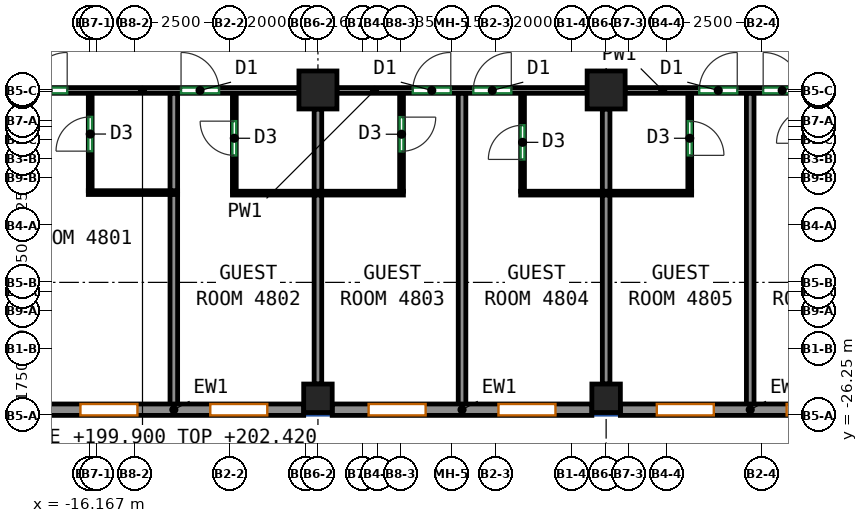
"""IFC4 building model, lengths in metres.
Left out: names, types, materials, properties, quantities, classifications, styles, units other than length and angle.
Written with IfcOpenShell. Run it as: python <this file> out.ifc"""

import sys

from ifc_helpers import new_model, si_unit, direction, frame, frame_2d, origin, origin_2d, place, context, subcontext, project, spatial, rectangle, extrude, source, transform, mapped, element, fill, save


model = new_model("IFC4")
c1 = context("Model", 3, precision=1e-05, world=origin(), true_north=direction((0.0, 1.0)))
c2 = subcontext(c1, "Body", "Model", "MODEL_VIEW")
j1 = project(units=[si_unit("LENGTHUNIT", "METRE"), si_unit("PLANEANGLEUNIT", "RADIAN")], contexts=[c1])
p1 = place(None, origin())
s1 = spatial("IfcSite", under=j1, at=p1, CompositionType="ELEMENT")
p2 = place(p1, origin())
s2 = spatial("IfcBuilding", under=s1, at=p2, CompositionType="ELEMENT")
p3 = place(p2, frame((0.0, 0.0, 199.9)))
s3 = spatial("IfcBuildingStorey", under=s2, at=p3, CompositionType="ELEMENT", Elevation=199.9)
m1 = source(origin(), c2, "Body", "SweptSolid", [
    extrude(rectangle(XDim=0.75, YDim=0.75, at=origin_2d()), origin(), (0.0, 0.0, 1.0), 3.12),
])
p4 = place(p3, frame((-10.167, -25.8, 0.0), z_axis=(0.0, 0.0, 1.0), x_axis=(1.0, 0.0, 0.0)))
e1 = element("IfcColumn", 1, at=p4, inside=s3, PredefinedType="COLUMN", context=c2, shape_type="MappedRepresentation", body=[
    mapped(m1, transform((0.0, 0.0, 0.0))),
])
m2 = source(origin(), c2, "Body", "SweptSolid", [
    extrude(rectangle(XDim=1.0, YDim=1.0, at=origin_2d()), origin(), (0.0, 0.0, 1.0), 3.12),
])
p5 = place(p3, frame((-10.167, -17.688, 0.0), z_axis=(0.0, 0.0, 1.0), x_axis=(1.0, 0.0, 0.0)))
e2 = element("IfcColumn", 2, at=p5, inside=s3, PredefinedType="COLUMN", context=c2, shape_type="MappedRepresentation", body=[
    mapped(m2, transform((0.0, 0.0, 0.0))),
])
p6 = place(p3, frame((-2.583, -25.8, 0.0), z_axis=(0.0, 0.0, 1.0), x_axis=(1.0, 0.0, 0.0)))
e3 = element("IfcColumn", 3, at=p6, inside=s3, PredefinedType="COLUMN", context=c2, shape_type="MappedRepresentation", body=[
    mapped(m1, transform((0.0, 0.0, 0.0))),
])
p7 = place(p3, frame((-2.583, -17.688, 0.0), z_axis=(0.0, 0.0, 1.0), x_axis=(1.0, 0.0, 0.0)))
e4 = element("IfcColumn", 4, at=p7, inside=s3, PredefinedType="COLUMN", context=c2, shape_type="MappedRepresentation", body=[
    mapped(m2, transform((0.0, 0.0, 0.0))),
])
m3 = source(origin(), c2, "Body", "SweptSolid", [
    extrude(rectangle(XDim=6.833, YDim=0.3, at=frame_2d((3.417, 0.0))), origin(), (0.0, 0.0, 1.0), 3.12),
])
p8 = place(p3, frame((-17.375, -26.1, 0.0), z_axis=(0.0, 0.0, 1.0), x_axis=(1.0, 0.0, 0.0)))
e5 = element("IfcWall", 5, at=p8, inside=s3, PredefinedType="SOLIDWALL", context=c2, shape_type="MappedRepresentation", body=[
    mapped(m3, transform((0.0, 0.0, 0.0))),
])
p9 = place(p8, frame((0.958, 0.0, 0.85)))
e6 = element("IfcOpeningElement", 6, at=p9, cuts=e5, PredefinedType="OPENING", context=c2, shape_type="SweptSolid", body=[
    extrude(rectangle(XDim=1.5, YDim=1.95, at=frame_2d((0.75, 0.975))), frame((0.0, 0.16, 0.0), z_axis=(0.0, -1.0, 0.0), x_axis=(1.0, 0.0, 0.0)), (0.0, 0.0, 1.0), 0.32),
])
p10 = place(p8, frame((4.375, 0.0, 0.85)))
e7 = element("IfcOpeningElement", 7, at=p10, cuts=e5, PredefinedType="OPENING", context=c2, shape_type="SweptSolid", body=[
    extrude(rectangle(XDim=1.5, YDim=1.95, at=frame_2d((0.75, 0.975))), frame((0.0, 0.16, 0.0), z_axis=(0.0, -1.0, 0.0), x_axis=(1.0, 0.0, 0.0)), (0.0, 0.0, 1.0), 0.32),
])
m4 = source(origin(), c2, "Body", "SweptSolid", [
    extrude(rectangle(XDim=6.833, YDim=0.3, at=frame_2d((3.417, 0.0))), origin(), (0.0, 0.0, 1.0), 3.12),
])
p11 = place(p3, frame((-9.792, -26.1, 0.0), z_axis=(0.0, 0.0, 1.0), x_axis=(1.0, 0.0, 0.0)))
e8 = element("IfcWall", 8, at=p11, inside=s3, PredefinedType="SOLIDWALL", context=c2, shape_type="MappedRepresentation", body=[
    mapped(m4, transform((0.0, 0.0, 0.0))),
])
p12 = place(p11, frame((0.958, 0.0, 0.85)))
e9 = element("IfcOpeningElement", 9, at=p12, cuts=e8, PredefinedType="OPENING", context=c2, shape_type="SweptSolid", body=[
    extrude(rectangle(XDim=1.5, YDim=1.95, at=frame_2d((0.75, 0.975))), frame((0.0, 0.16, 0.0), z_axis=(0.0, -1.0, 0.0), x_axis=(1.0, 0.0, 0.0)), (0.0, 0.0, 1.0), 0.32),
])
p13 = place(p11, frame((4.375, 0.0, 0.85)))
e10 = element("IfcOpeningElement", 10, at=p13, cuts=e8, PredefinedType="OPENING", context=c2, shape_type="SweptSolid", body=[
    extrude(rectangle(XDim=1.5, YDim=1.95, at=frame_2d((0.75, 0.975))), frame((0.0, 0.16, 0.0), z_axis=(0.0, -1.0, 0.0), x_axis=(1.0, 0.0, 0.0)), (0.0, 0.0, 1.0), 0.32),
])
p14 = place(p3, frame((-2.208, -26.1, 0.0), z_axis=(0.0, 0.0, 1.0), x_axis=(1.0, 0.0, 0.0)))
e11 = element("IfcWall", 11, at=p14, inside=s3, PredefinedType="SOLIDWALL", context=c2, shape_type="MappedRepresentation", body=[
    mapped(m3, transform((0.0, 0.0, 0.0))),
])
p15 = place(p14, frame((0.958, 0.0, 0.85)))
e12 = element("IfcOpeningElement", 12, at=p15, cuts=e11, PredefinedType="OPENING", context=c2, shape_type="SweptSolid", body=[
    extrude(rectangle(XDim=1.5, YDim=1.95, at=frame_2d((0.75, 0.975))), frame((0.0, 0.16, 0.0), z_axis=(0.0, -1.0, 0.0), x_axis=(1.0, 0.0, 0.0)), (0.0, 0.0, 1.0), 0.32),
])
p16 = place(p14, frame((4.375, 0.0, 0.85)))
e13 = element("IfcOpeningElement", 13, at=p16, cuts=e11, PredefinedType="OPENING", context=c2, shape_type="SweptSolid", body=[
    extrude(rectangle(XDim=1.5, YDim=1.95, at=frame_2d((0.75, 0.975))), frame((0.0, 0.16, 0.0), z_axis=(0.0, -1.0, 0.0), x_axis=(1.0, 0.0, 0.0)), (0.0, 0.0, 1.0), 0.32),
])
p17 = place(p3, frame((-18.9, -17.7, 0.0), z_axis=(0.0, 0.0, 1.0), x_axis=(1.0, 0.0, 0.0)))
e14 = element("IfcWall", 14, at=p17, inside=s3, PredefinedType="PARTITIONING", context=c2, shape_type="SweptSolid", body=[
    extrude(rectangle(XDim=8.233, YDim=0.15, at=frame_2d((4.116, 0.0))), origin(), (0.0, 0.0, 1.0), 2.52),
])
p18 = place(p17, frame((1.135, 0.0, 0.0)))
e15 = element("IfcOpeningElement", 15, at=p18, cuts=e14, PredefinedType="OPENING", context=c2, shape_type="SweptSolid", body=[
    extrude(rectangle(XDim=1.0, YDim=2.1, at=frame_2d((0.5, 1.05))), frame((0.0, 0.085, 0.0), z_axis=(0.0, -1.0, 0.0), x_axis=(1.0, 0.0, 0.0)), (0.0, 0.0, 1.0), 0.17),
])
p19 = place(p17, frame((5.131, 0.0, 0.0)))
e16 = element("IfcOpeningElement", 16, at=p19, cuts=e14, PredefinedType="OPENING", context=c2, shape_type="SweptSolid", body=[
    extrude(rectangle(XDim=1.0, YDim=2.1, at=frame_2d((0.5, 1.05))), frame((0.0, 0.085, 0.0), z_axis=(0.0, -1.0, 0.0), x_axis=(1.0, 0.0, 0.0)), (0.0, 0.0, 1.0), 0.17),
])
p20 = place(p3, frame((-9.667, -17.7, 0.0), z_axis=(0.0, 0.0, 1.0), x_axis=(1.0, 0.0, 0.0)))
e17 = element("IfcWall", 17, at=p20, inside=s3, PredefinedType="PARTITIONING", context=c2, shape_type="SweptSolid", body=[
    extrude(rectangle(XDim=6.584, YDim=0.15, at=frame_2d((3.292, 0.0))), origin(), (0.0, 0.0, 1.0), 3.12),
])
p21 = place(p20, frame((1.996, 0.0, 0.0)))
e18 = element("IfcOpeningElement", 18, at=p21, cuts=e17, PredefinedType="OPENING", context=c2, shape_type="SweptSolid", body=[
    extrude(rectangle(XDim=1.0, YDim=2.1, at=frame_2d((0.5, 1.05))), frame((0.0, 0.085, 0.0), z_axis=(0.0, -1.0, 0.0), x_axis=(1.0, 0.0, 0.0)), (0.0, 0.0, 1.0), 0.17),
])
p22 = place(p20, frame((3.588, 0.0, 0.0)))
e19 = element("IfcOpeningElement", 19, at=p22, cuts=e17, PredefinedType="OPENING", context=c2, shape_type="SweptSolid", body=[
    extrude(rectangle(XDim=1.0, YDim=2.1, at=frame_2d((0.5, 1.05))), frame((0.0, 0.085, 0.0), z_axis=(0.0, -1.0, 0.0), x_axis=(1.0, 0.0, 0.0)), (0.0, 0.0, 1.0), 0.17),
])
p23 = place(p3, frame((-2.083, -17.7, 0.0), z_axis=(0.0, 0.0, 1.0), x_axis=(1.0, 0.0, 0.0)))
e20 = element("IfcWall", 20, at=p23, inside=s3, PredefinedType="PARTITIONING", context=c2, shape_type="SweptSolid", body=[
    extrude(rectangle(XDim=6.583, YDim=0.15, at=frame_2d((3.292, 0.0))), origin(), (0.0, 0.0, 1.0), 3.12),
])
p24 = place(p23, frame((1.95, 0.0, 0.0)))
e21 = element("IfcOpeningElement", 21, at=p24, cuts=e20, PredefinedType="OPENING", context=c2, shape_type="SweptSolid", body=[
    extrude(rectangle(XDim=1.0, YDim=2.1, at=frame_2d((0.5, 1.05))), frame((0.0, 0.085, 0.0), z_axis=(0.0, -1.0, 0.0), x_axis=(1.0, 0.0, 0.0)), (0.0, 0.0, 1.0), 0.17),
])
p25 = place(p23, frame((3.632, 0.0, 0.0)))
e22 = element("IfcOpeningElement", 22, at=p25, cuts=e20, PredefinedType="OPENING", context=c2, shape_type="SweptSolid", body=[
    extrude(rectangle(XDim=1.0, YDim=2.1, at=frame_2d((0.5, 1.05))), frame((0.0, 0.085, 0.0), z_axis=(0.0, -1.0, 0.0), x_axis=(1.0, 0.0, 0.0)), (0.0, 0.0, 1.0), 0.17),
])
p26 = place(p3, frame((-16.159, -20.338, 0.0), z_axis=(0.0, 0.0, 1.0), x_axis=(0.0, 1.0, 0.0)))
e23 = element("IfcWall", 23, at=p26, inside=s3, PredefinedType="PARTITIONING", context=c2, shape_type="SweptSolid", body=[
    extrude(rectangle(XDim=2.561, YDim=0.1, at=frame_2d((1.28, 0.0))), origin(), (0.0, 0.0, 1.0), 3.12),
])
p27 = place(p26, frame((1.041, 0.0, 0.0)))
e24 = element("IfcOpeningElement", 24, at=p27, cuts=e23, PredefinedType="OPENING", context=c2, shape_type="SweptSolid", body=[
    extrude(rectangle(XDim=0.9, YDim=2.1, at=frame_2d((0.45, 1.05))), frame((0.0, 0.06, 0.0), z_axis=(0.0, -1.0, 0.0), x_axis=(1.0, 0.0, 0.0)), (0.0, 0.0, 1.0), 0.12),
])
p28 = place(p3, frame((-16.209, -20.388, 0.0), z_axis=(0.0, 0.0, 1.0), x_axis=(1.0, 0.0, 0.0)))
e25 = element("IfcWall", 25, at=p28, inside=s3, PredefinedType="PARTITIONING", context=c2, shape_type="SweptSolid", body=[
    extrude(rectangle(XDim=2.35, YDim=0.1, at=frame_2d((1.175, 0.0))), origin(), (0.0, 0.0, 1.0), 3.12),
])
p29 = place(p3, frame((-13.959, -26.0, 0.0), z_axis=(0.0, 0.0, 1.0), x_axis=(0.0, 1.0, 0.0)))
e26 = element("IfcWall", 26, at=p29, inside=s3, PredefinedType="PARTITIONING", context=c2, shape_type="SweptSolid", body=[
    extrude(rectangle(XDim=5.562, YDim=0.2, at=frame_2d((2.781, 0.0))), origin(), (0.0, 0.0, 1.0), 3.12),
])
p30 = place(p3, frame((-13.959, -20.338, 0.0), z_axis=(0.0, 0.0, 1.0), x_axis=(0.0, 1.0, 0.0)))
e27 = element("IfcWall", 27, at=p30, inside=s3, PredefinedType="PARTITIONING", context=c2, shape_type="SweptSolid", body=[
    extrude(rectangle(XDim=2.561, YDim=0.2, at=frame_2d((1.28, 0.0))), origin(), (0.0, 0.0, 1.0), 3.12),
])
p31 = place(p3, frame((-12.367, -20.352, 0.0), z_axis=(0.0, 0.0, 1.0), x_axis=(0.0, 1.0, 0.0)))
e28 = element("IfcWall", 28, at=p31, inside=s3, PredefinedType="PARTITIONING", context=c2, shape_type="SweptSolid", body=[
    extrude(rectangle(XDim=2.575, YDim=0.1, at=frame_2d((1.288, 0.0))), origin(), (0.0, 0.0, 1.0), 3.12),
])
p32 = place(p31, frame((0.944, 0.0, 0.0)))
e29 = element("IfcOpeningElement", 29, at=p32, cuts=e28, PredefinedType="OPENING", context=c2, shape_type="SweptSolid", body=[
    extrude(rectangle(XDim=0.9, YDim=2.1, at=frame_2d((0.45, 1.05))), frame((0.0, 0.06, 0.0), z_axis=(0.0, -1.0, 0.0), x_axis=(1.0, 0.0, 0.0)), (0.0, 0.0, 1.0), 0.12),
])
p33 = place(p3, frame((-12.417, -20.402, 0.0), z_axis=(0.0, 0.0, 1.0), x_axis=(1.0, 0.0, 0.0)))
e30 = element("IfcWall", 30, at=p33, inside=s3, PredefinedType="PARTITIONING", context=c2, shape_type="SweptSolid", body=[
    extrude(rectangle(XDim=4.5, YDim=0.1, at=frame_2d((2.25, 0.0))), origin(), (0.0, 0.0, 1.0), 3.12),
])
p34 = place(p3, frame((-10.167, -25.425, 0.0), z_axis=(0.0, 0.0, 1.0), x_axis=(0.0, 1.0, 0.0)))
e31 = element("IfcWall", 31, at=p34, inside=s3, PredefinedType="PARTITIONING", context=c2, shape_type="SweptSolid", body=[
    extrude(rectangle(XDim=4.973, YDim=0.2, at=frame_2d((2.487, 0.0))), origin(), (0.0, 0.0, 1.0), 3.12),
])
p35 = place(p3, frame((-10.167, -20.352, 0.0), z_axis=(0.0, 0.0, 1.0), x_axis=(0.0, 1.0, 0.0)))
e32 = element("IfcWall", 32, at=p35, inside=s3, PredefinedType="PARTITIONING", context=c2, shape_type="SweptSolid", body=[
    extrude(rectangle(XDim=2.164, YDim=0.2, at=frame_2d((1.082, 0.0))), origin(), (0.0, 0.0, 1.0), 3.12),
])
p36 = place(p3, frame((-7.967, -17.777, 0.0), z_axis=(0.0, 0.0, 1.0), x_axis=(0.0, -1.0, 0.0)))
e33 = element("IfcWall", 33, at=p36, inside=s3, PredefinedType="PARTITIONING", context=c2, shape_type="SweptSolid", body=[
    extrude(rectangle(XDim=2.575, YDim=0.1, at=frame_2d((1.288, 0.0))), origin(), (0.0, 0.0, 1.0), 3.12),
])
p37 = place(p36, frame((0.625, 0.0, 0.0)))
e34 = element("IfcOpeningElement", 34, at=p37, cuts=e33, PredefinedType="OPENING", context=c2, shape_type="SweptSolid", body=[
    extrude(rectangle(XDim=0.9, YDim=2.1, at=frame_2d((0.45, 1.05))), frame((0.0, 0.06, 0.0), z_axis=(0.0, -1.0, 0.0), x_axis=(1.0, 0.0, 0.0)), (0.0, 0.0, 1.0), 0.12),
])
p38 = place(p3, frame((-6.375, -26.0, 0.0), z_axis=(0.0, 0.0, 1.0), x_axis=(0.0, 1.0, 0.0)))
e35 = element("IfcWall", 35, at=p38, inside=s3, PredefinedType="PARTITIONING", context=c2, shape_type="SweptSolid", body=[
    extrude(rectangle(XDim=8.223, YDim=0.2, at=frame_2d((4.111, 0.0))), origin(), (0.0, 0.0, 1.0), 3.12),
])
p39 = place(p3, frame((-4.783, -20.352, 0.0), z_axis=(0.0, 0.0, 1.0), x_axis=(0.0, 1.0, 0.0)))
e36 = element("IfcWall", 36, at=p39, inside=s3, PredefinedType="PARTITIONING", context=c2, shape_type="SweptSolid", body=[
    extrude(rectangle(XDim=2.575, YDim=0.1, at=frame_2d((1.288, 0.0))), origin(), (0.0, 0.0, 1.0), 3.12),
])
p40 = place(p39, frame((0.837, 0.0, 0.0)))
e37 = element("IfcOpeningElement", 37, at=p40, cuts=e36, PredefinedType="OPENING", context=c2, shape_type="SweptSolid", body=[
    extrude(rectangle(XDim=0.9, YDim=2.1, at=frame_2d((0.45, 1.05))), frame((0.0, 0.06, 0.0), z_axis=(0.0, -1.0, 0.0), x_axis=(1.0, 0.0, 0.0)), (0.0, 0.0, 1.0), 0.12),
])
p41 = place(p3, frame((-4.833, -20.402, 0.0), z_axis=(0.0, 0.0, 1.0), x_axis=(1.0, 0.0, 0.0)))
e38 = element("IfcWall", 38, at=p41, inside=s3, PredefinedType="PARTITIONING", context=c2, shape_type="SweptSolid", body=[
    extrude(rectangle(XDim=4.5, YDim=0.1, at=frame_2d((2.25, 0.0))), origin(), (0.0, 0.0, 1.0), 3.12),
])
p42 = place(p3, frame((-2.583, -25.425, 0.0), z_axis=(0.0, 0.0, 1.0), x_axis=(0.0, 1.0, 0.0)))
e39 = element("IfcWall", 39, at=p42, inside=s3, PredefinedType="PARTITIONING", context=c2, shape_type="SweptSolid", body=[
    extrude(rectangle(XDim=4.973, YDim=0.2, at=frame_2d((2.487, 0.0))), origin(), (0.0, 0.0, 1.0), 3.12),
])
p43 = place(p3, frame((-2.583, -20.352, 0.0), z_axis=(0.0, 0.0, 1.0), x_axis=(0.0, 1.0, 0.0)))
e40 = element("IfcWall", 40, at=p43, inside=s3, PredefinedType="PARTITIONING", context=c2, shape_type="SweptSolid", body=[
    extrude(rectangle(XDim=2.164, YDim=0.2, at=frame_2d((1.082, 0.0))), origin(), (0.0, 0.0, 1.0), 3.12),
])
p44 = place(p3, frame((-0.383, -17.777, 0.0), z_axis=(0.0, 0.0, 1.0), x_axis=(0.0, -1.0, 0.0)))
e41 = element("IfcWall", 41, at=p44, inside=s3, PredefinedType="PARTITIONING", context=c2, shape_type="SweptSolid", body=[
    extrude(rectangle(XDim=2.575, YDim=0.1, at=frame_2d((1.288, 0.0))), origin(), (0.0, 0.0, 1.0), 3.12),
])
p45 = place(p44, frame((0.731, 0.0, 0.0)))
e42 = element("IfcOpeningElement", 42, at=p45, cuts=e41, PredefinedType="OPENING", context=c2, shape_type="SweptSolid", body=[
    extrude(rectangle(XDim=0.9, YDim=2.1, at=frame_2d((0.45, 1.05))), frame((0.0, 0.06, 0.0), z_axis=(0.0, -1.0, 0.0), x_axis=(1.0, 0.0, 0.0)), (0.0, 0.0, 1.0), 0.12),
])
p46 = place(p3, frame((1.208, -26.0, 0.0), z_axis=(0.0, 0.0, 1.0), x_axis=(0.0, 1.0, 0.0)))
e43 = element("IfcWall", 43, at=p46, inside=s3, PredefinedType="PARTITIONING", context=c2, shape_type="SweptSolid", body=[
    extrude(rectangle(XDim=8.223, YDim=0.2, at=frame_2d((4.111, 0.0))), origin(), (0.0, 0.0, 1.0), 3.12),
])
p47 = place(p9, origin())
e44 = element("IfcWindow", 44, at=p47, inside=s3, PartitioningType="SINGLE_PANEL", PredefinedType="WINDOW", context=c2, shape_type="SweptSolid", body=[
    extrude(rectangle(XDim=1.5, YDim=1.95, at=frame_2d((0.75, 0.975))), frame((0.0, 0.03, 0.0), z_axis=(0.0, -1.0, 0.0), x_axis=(1.0, 0.0, 0.0)), (0.0, 0.0, 1.0), 0.06),
])
fill(e6, e44)
p48 = place(p10, origin())
e45 = element("IfcWindow", 45, at=p48, inside=s3, PartitioningType="SINGLE_PANEL", PredefinedType="WINDOW", context=c2, shape_type="SweptSolid", body=[
    extrude(rectangle(XDim=1.5, YDim=1.95, at=frame_2d((0.75, 0.975))), frame((0.0, 0.03, 0.0), z_axis=(0.0, -1.0, 0.0), x_axis=(1.0, 0.0, 0.0)), (0.0, 0.0, 1.0), 0.06),
])
fill(e7, e45)
p49 = place(p12, origin())
e46 = element("IfcWindow", 46, at=p49, inside=s3, PartitioningType="SINGLE_PANEL", PredefinedType="WINDOW", context=c2, shape_type="SweptSolid", body=[
    extrude(rectangle(XDim=1.5, YDim=1.95, at=frame_2d((0.75, 0.975))), frame((0.0, 0.03, 0.0), z_axis=(0.0, -1.0, 0.0), x_axis=(1.0, 0.0, 0.0)), (0.0, 0.0, 1.0), 0.06),
])
fill(e9, e46)
p50 = place(p13, origin())
e47 = element("IfcWindow", 47, at=p50, inside=s3, PartitioningType="SINGLE_PANEL", PredefinedType="WINDOW", context=c2, shape_type="SweptSolid", body=[
    extrude(rectangle(XDim=1.5, YDim=1.95, at=frame_2d((0.75, 0.975))), frame((0.0, 0.03, 0.0), z_axis=(0.0, -1.0, 0.0), x_axis=(1.0, 0.0, 0.0)), (0.0, 0.0, 1.0), 0.06),
])
fill(e10, e47)
p51 = place(p15, origin())
e48 = element("IfcWindow", 48, at=p51, inside=s3, PartitioningType="SINGLE_PANEL", PredefinedType="WINDOW", context=c2, shape_type="SweptSolid", body=[
    extrude(rectangle(XDim=1.5, YDim=1.95, at=frame_2d((0.75, 0.975))), frame((0.0, 0.03, 0.0), z_axis=(0.0, -1.0, 0.0), x_axis=(1.0, 0.0, 0.0)), (0.0, 0.0, 1.0), 0.06),
])
fill(e12, e48)
p52 = place(p16, origin())
e49 = element("IfcWindow", 49, at=p52, inside=s3, PartitioningType="SINGLE_PANEL", PredefinedType="WINDOW", context=c2, shape_type="SweptSolid", body=[
    extrude(rectangle(XDim=1.5, YDim=1.95, at=frame_2d((0.75, 0.975))), frame((0.0, 0.03, 0.0), z_axis=(0.0, -1.0, 0.0), x_axis=(1.0, 0.0, 0.0)), (0.0, 0.0, 1.0), 0.06),
])
fill(e13, e49)
p53 = place(p40, origin())
e50 = element("IfcDoor", 50, at=p53, inside=s3, OperationType="SINGLE_SWING_LEFT", PredefinedType="DOOR", context=c2, shape_type="SweptSolid", body=[
    extrude(rectangle(XDim=0.9, YDim=2.1, at=frame_2d((0.45, 1.05))), frame((0.0, 0.025, 0.0), z_axis=(0.0, -1.0, 0.0), x_axis=(1.0, 0.0, 0.0)), (0.0, 0.0, 1.0), 0.05),
])
fill(e37, e50)
p54 = place(p32, origin())
e51 = element("IfcDoor", 51, at=p54, inside=s3, OperationType="SINGLE_SWING_RIGHT", PredefinedType="DOOR", context=c2, shape_type="SweptSolid", body=[
    extrude(rectangle(XDim=0.9, YDim=2.1, at=frame_2d((0.45, 1.05))), frame((0.0, 0.025, 0.0), z_axis=(0.0, -1.0, 0.0), x_axis=(1.0, 0.0, 0.0)), (0.0, 0.0, 1.0), 0.05),
])
fill(e29, e51)
p55 = place(p45, origin())
e52 = element("IfcDoor", 52, at=p55, inside=s3, OperationType="SINGLE_SWING_RIGHT", PredefinedType="DOOR", context=c2, shape_type="SweptSolid", body=[
    extrude(rectangle(XDim=0.9, YDim=2.1, at=frame_2d((0.45, 1.05))), frame((0.0, 0.025, 0.0), z_axis=(0.0, -1.0, 0.0), x_axis=(1.0, 0.0, 0.0)), (0.0, 0.0, 1.0), 0.05),
])
fill(e42, e52)
p56 = place(p27, origin())
e53 = element("IfcDoor", 53, at=p56, inside=s3, OperationType="SINGLE_SWING_LEFT", PredefinedType="DOOR", context=c2, shape_type="SweptSolid", body=[
    extrude(rectangle(XDim=0.9, YDim=2.1, at=frame_2d((0.45, 1.05))), frame((0.0, 0.025, 0.0), z_axis=(0.0, -1.0, 0.0), x_axis=(1.0, 0.0, 0.0)), (0.0, 0.0, 1.0), 0.05),
])
fill(e24, e53)
p57 = place(p37, origin())
e54 = element("IfcDoor", 54, at=p57, inside=s3, OperationType="SINGLE_SWING_LEFT", PredefinedType="DOOR", context=c2, shape_type="SweptSolid", body=[
    extrude(rectangle(XDim=0.9, YDim=2.1, at=frame_2d((0.45, 1.05))), frame((0.0, 0.025, 0.0), z_axis=(0.0, -1.0, 0.0), x_axis=(1.0, 0.0, 0.0)), (0.0, 0.0, 1.0), 0.05),
])
fill(e34, e54)
p58 = place(p18, origin())
e55 = element("IfcDoor", 55, at=p58, inside=s3, OperationType="SINGLE_SWING_RIGHT", PredefinedType="DOOR", context=c2, shape_type="SweptSolid", body=[
    extrude(rectangle(XDim=1.0, YDim=2.1, at=frame_2d((0.5, 1.05))), frame((0.0, 0.025, 0.0), z_axis=(0.0, -1.0, 0.0), x_axis=(1.0, 0.0, 0.0)), (0.0, 0.0, 1.0), 0.05),
])
fill(e15, e55)
p59 = place(p19, origin())
e56 = element("IfcDoor", 56, at=p59, inside=s3, OperationType="SINGLE_SWING_LEFT", PredefinedType="DOOR", context=c2, shape_type="SweptSolid", body=[
    extrude(rectangle(XDim=1.0, YDim=2.1, at=frame_2d((0.5, 1.05))), frame((0.0, 0.025, 0.0), z_axis=(0.0, -1.0, 0.0), x_axis=(1.0, 0.0, 0.0)), (0.0, 0.0, 1.0), 0.05),
])
fill(e16, e56)
p60 = place(p21, origin())
e57 = element("IfcDoor", 57, at=p60, inside=s3, OperationType="SINGLE_SWING_RIGHT", PredefinedType="DOOR", context=c2, shape_type="SweptSolid", body=[
    extrude(rectangle(XDim=1.0, YDim=2.1, at=frame_2d((0.5, 1.05))), frame((0.0, 0.025, 0.0), z_axis=(0.0, -1.0, 0.0), x_axis=(1.0, 0.0, 0.0)), (0.0, 0.0, 1.0), 0.05),
])
fill(e18, e57)
p61 = place(p22, origin())
e58 = element("IfcDoor", 58, at=p61, inside=s3, OperationType="SINGLE_SWING_RIGHT", PredefinedType="DOOR", context=c2, shape_type="SweptSolid", body=[
    extrude(rectangle(XDim=1.0, YDim=2.1, at=frame_2d((0.5, 1.05))), frame((0.0, 0.025, 0.0), z_axis=(0.0, -1.0, 0.0), x_axis=(1.0, 0.0, 0.0)), (0.0, 0.0, 1.0), 0.05),
])
fill(e19, e58)
p62 = place(p24, origin())
e59 = element("IfcDoor", 59, at=p62, inside=s3, OperationType="SINGLE_SWING_RIGHT", PredefinedType="DOOR", context=c2, shape_type="SweptSolid", body=[
    extrude(rectangle(XDim=1.0, YDim=2.1, at=frame_2d((0.5, 1.05))), frame((0.0, 0.025, 0.0), z_axis=(0.0, -1.0, 0.0), x_axis=(1.0, 0.0, 0.0)), (0.0, 0.0, 1.0), 0.05),
])
fill(e21, e59)
p63 = place(p25, origin())
e60 = element("IfcDoor", 60, at=p63, inside=s3, OperationType="SINGLE_SWING_LEFT", PredefinedType="DOOR", context=c2, shape_type="SweptSolid", body=[
    extrude(rectangle(XDim=1.0, YDim=2.1, at=frame_2d((0.5, 1.05))), frame((0.0, 0.025, 0.0), z_axis=(0.0, -1.0, 0.0), x_axis=(1.0, 0.0, 0.0)), (0.0, 0.0, 1.0), 0.05),
])
fill(e22, e60)
save(model, sys.argv[1])
